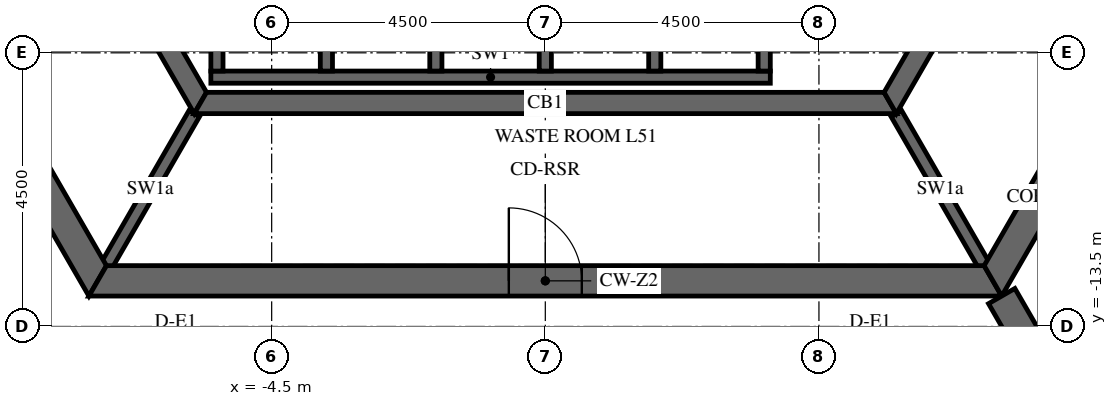
"""IFC4 building model, lengths in metres.
Left out: names, types, materials, properties, quantities, classifications, styles, units other than length and angle.
Written with IfcOpenShell. Run it as: python <this file> out.ifc"""

import sys

from ifc_helpers import new_model, si_unit, direction, frame, frame_2d, origin, place, context, subcontext, project, spatial, polyline, rectangle, outline, extrude, element, fill, save


model = new_model("IFC4")
c1 = context("Model", 3, precision=1e-05, world=origin(), true_north=direction((0.0, 1.0)))
c2 = subcontext(c1, "Body", "Model", "MODEL_VIEW")
j1 = project(units=[si_unit("LENGTHUNIT", "METRE"), si_unit("PLANEANGLEUNIT", "RADIAN")], contexts=[c1])
p1 = place(None, origin())
s1 = spatial("IfcSite", under=j1, at=p1, CompositionType="ELEMENT")
p2 = place(p1, origin())
s2 = spatial("IfcBuilding", under=s1, at=p2, CompositionType="ELEMENT")
p3 = place(p2, frame((0.0, 0.0, 215.1)))
s3 = spatial("IfcBuildingStorey", under=s2, at=p3, CompositionType="ELEMENT", Elevation=215.1)
p4 = place(p3, frame((-14.722, 0.0, -0.15), z_axis=(0.0, 0.0, 1.0), x_axis=(0.50000571537, -0.866022103989, 0.0)))
e1 = element("IfcWall", 1, at=p4, inside=s3, PredefinedType="SHEAR", context=c2, shape_type="SweptSolid", body=[
    extrude(outline(polyline([(-0.144, -0.25), (14.867, -0.25), (14.578, 0.25), (0.144, 0.25), (-0.144, -0.25)])), origin(), (0.0, 0.0, 1.0), 3.9),
])
p5 = place(p4, frame((6.432, 0.0, 0.15)))
e2 = element("IfcOpeningElement", 2, at=p5, cuts=e1, PredefinedType="OPENING", context=c2, shape_type="SweptSolid", body=[
    extrude(rectangle(XDim=1.8, YDim=2.4, at=frame_2d((0.9, 1.2))), frame((0.0, 0.26, 0.0), z_axis=(0.0, -1.0, 0.0), x_axis=(1.0, 0.0, 0.0)), (0.0, 0.0, 1.0), 0.52),
])
p6 = place(p3, frame((-7.361, -12.75, -0.15), z_axis=(0.0, 0.0, 1.0), x_axis=(1.0, 0.0, 0.0)))
e3 = element("IfcWall", 3, at=p6, inside=s3, PredefinedType="SHEAR", context=c2, shape_type="SweptSolid", body=[
    extrude(outline(polyline([(-0.144, -0.25), (14.866, -0.25), (14.578, 0.25), (0.144, 0.25), (-0.144, -0.25)])), origin(), (0.0, 0.0, 1.0), 3.9),
])
p7 = place(p6, frame((6.761, 0.0, 0.15)))
e4 = element("IfcOpeningElement", 4, at=p7, cuts=e3, PredefinedType="OPENING", context=c2, shape_type="SweptSolid", body=[
    extrude(rectangle(XDim=1.2, YDim=2.4, at=frame_2d((0.6, 1.2))), frame((0.0, 0.26, 0.0), z_axis=(0.0, -1.0, 0.0), x_axis=(1.0, 0.0, 0.0)), (0.0, 0.0, 1.0), 0.52),
])
p8 = place(p3, frame((7.361, -12.75, -0.15), z_axis=(0.0, 0.0, 1.0), x_axis=(0.50000571537, 0.866022103989, 0.0)))
e5 = element("IfcWall", 5, at=p8, inside=s3, PredefinedType="SHEAR", context=c2, shape_type="SweptSolid", body=[
    extrude(outline(polyline([(-0.144, -0.25), (14.867, -0.25), (14.578, 0.25), (0.144, 0.25), (-0.144, -0.25)])), origin(), (0.0, 0.0, 1.0), 3.9),
])
p9 = place(p8, frame((6.49, 0.0, 0.15)))
e6 = element("IfcOpeningElement", 6, at=p9, cuts=e5, PredefinedType="OPENING", context=c2, shape_type="SweptSolid", body=[
    extrude(rectangle(XDim=1.8, YDim=2.4, at=frame_2d((0.9, 1.2))), frame((0.0, 0.26, 0.0), z_axis=(0.0, -1.0, 0.0), x_axis=(1.0, 0.0, 0.0)), (0.0, 0.0, 1.0), 0.52),
])
p10 = place(p3, frame((7.506, -13.0, -0.15), z_axis=(0.0, 0.0, 1.0), x_axis=(0.499988271576, -0.866032175087, 0.0)))
e7 = element("IfcWall", 7, at=p10, inside=s3, PredefinedType="SHEAR", context=c2, shape_type="SweptSolid", body=[
    extrude(rectangle(XDim=15.424, YDim=0.5, at=frame_2d((7.712, 0.0))), origin(), (0.0, 0.0, 1.0), 3.9),
])
p11 = place(p10, frame((6.812, 0.0, 0.15)))
e8 = element("IfcOpeningElement", 8, at=p11, cuts=e7, PredefinedType="OPENING", context=c2, shape_type="SweptSolid", body=[
    extrude(rectangle(XDim=1.8, YDim=2.4, at=frame_2d((0.9, 1.2))), frame((0.0, 0.26, 0.0), z_axis=(0.0, -1.0, 0.0), x_axis=(1.0, 0.0, 0.0)), (0.0, 0.0, 1.0), 0.52),
])
p12 = place(p3, frame((-11.345, 0.0, -0.15), z_axis=(0.0, 0.0, 1.0), x_axis=(0.499995046907, -0.866028263435, 0.0)))
e9 = element("IfcWall", 9, at=p12, inside=s3, PredefinedType="SHEAR", context=c2, shape_type="SweptSolid", body=[
    extrude(outline(polyline([(-0.101, -0.175), (11.446, -0.175), (11.244, 0.175), (0.101, 0.175), (-0.101, -0.175)])), origin(), (0.0, 0.0, 1.0), 3.9),
])
p13 = place(p12, frame((4.744, 0.0, 0.15)))
e10 = element("IfcOpeningElement", 10, at=p13, cuts=e9, PredefinedType="OPENING", context=c2, shape_type="SweptSolid", body=[
    extrude(rectangle(XDim=1.8, YDim=2.4, at=frame_2d((0.9, 1.2))), frame((0.0, 0.185, 0.0), z_axis=(0.0, -1.0, 0.0), x_axis=(1.0, 0.0, 0.0)), (0.0, 0.0, 1.0), 0.37),
])
p14 = place(p3, frame((-5.673, -9.825, -0.15), z_axis=(0.0, 0.0, 1.0), x_axis=(1.0, 0.0, 0.0)))
e11 = element("IfcWall", 11, at=p14, inside=s3, PredefinedType="SHEAR", context=c2, shape_type="SweptSolid", body=[
    extrude(outline(polyline([(-0.101, -0.175), (11.446, -0.175), (11.244, 0.175), (0.101, 0.175), (-0.101, -0.175)])), origin(), (0.0, 0.0, 1.0), 3.9),
])
p15 = place(p3, frame((5.673, -9.825, -0.15), z_axis=(0.0, 0.0, 1.0), x_axis=(0.499995046907, 0.866028263435, 0.0)))
e12 = element("IfcWall", 12, at=p15, inside=s3, PredefinedType="SHEAR", context=c2, shape_type="SweptSolid", body=[
    extrude(outline(polyline([(-0.101, -0.175), (11.446, -0.175), (11.244, 0.175), (0.101, 0.175), (-0.101, -0.175)])), origin(), (0.0, 0.0, 1.0), 3.9),
])
p16 = place(p15, frame((4.801, 0.0, 0.15)))
e13 = element("IfcOpeningElement", 13, at=p16, cuts=e12, PredefinedType="OPENING", context=c2, shape_type="SweptSolid", body=[
    extrude(rectangle(XDim=1.8, YDim=2.4, at=frame_2d((0.9, 1.2))), frame((0.0, 0.185, 0.0), z_axis=(0.0, -1.0, 0.0), x_axis=(1.0, 0.0, 0.0)), (0.0, 0.0, 1.0), 0.37),
])
p17 = place(p3, frame((-5.5, -9.4, -0.25), z_axis=(0.0, 0.0, 1.0), x_axis=(1.0, 0.0, 0.0)))
e14 = element("IfcWall", 14, at=p17, inside=s3, PredefinedType="SHEAR", context=c2, shape_type="SweptSolid", body=[
    extrude(rectangle(XDim=9.2, YDim=0.2, at=frame_2d((4.6, 0.0))), origin(), (0.0, 0.0, 1.0), 3.9),
])
for number, where, z_axis, x_axis in (
    (15, (-5.4, -9.3, -0.25), (0.0, 0.0, 1.0), (0.0, 1.0, 0.0)),
    (16, (-3.6, -9.3, -0.25), (0.0, 0.0, 1.0), (0.0, 1.0, 0.0)),
    (17, (-1.8, -9.3, -0.25), (0.0, 0.0, 1.0), (0.0, 1.0, 0.0)),
    (18, (0.0, -9.3, -0.25), (0.0, 0.0, 1.0), (0.0, 1.0, 0.0)),
    (19, (1.8, -9.3, -0.25), (0.0, 0.0, 1.0), (0.0, 1.0, 0.0)),
    (20, (3.6, -9.3, -0.25), (0.0, 0.0, 1.0), (0.0, 1.0, 0.0)),
):
    element("IfcWall", number, at=place(p3, frame(where, z_axis=z_axis, x_axis=x_axis)), inside=s3, PredefinedType="SHEAR", context=c2, shape_type="SweptSolid", body=[
        extrude(rectangle(XDim=2.9, YDim=0.2, at=frame_2d((1.45, 0.0))), origin(), (0.0, 0.0, 1.0), 3.9),
    ])
for number, where, z_axis, x_axis in (
    (21, (-5.773, -10.0, -0.15), (0.0, 0.0, 1.0), (-0.5, -0.866, 0.0)),
    (22, (5.773, -10.0, -0.15), (0.0, 0.0, 1.0), (0.5, -0.866, 0.0)),
):
    element("IfcWall", number, at=place(p3, frame(where, z_axis=z_axis, x_axis=x_axis)), inside=s3, PredefinedType="SHEAR", context=c2, shape_type="SweptSolid", body=[
        extrude(rectangle(XDim=2.887, YDim=0.2, at=frame_2d((1.443, 0.0))), origin(), (0.0, 0.0, 1.0), 3.9),
    ])
p18 = place(p7, origin())
e23 = element("IfcDoor", 23, at=p18, inside=s3, OperationType="SINGLE_SWING_LEFT", PredefinedType="DOOR", context=c2, shape_type="SweptSolid", body=[
    extrude(rectangle(XDim=1.2, YDim=2.4, at=frame_2d((0.6, 1.2))), frame((0.0, 0.025, 0.0), z_axis=(0.0, -1.0, 0.0), x_axis=(1.0, 0.0, 0.0)), (0.0, 0.0, 1.0), 0.05),
])
fill(e4, e23)
save(model, sys.argv[1])
